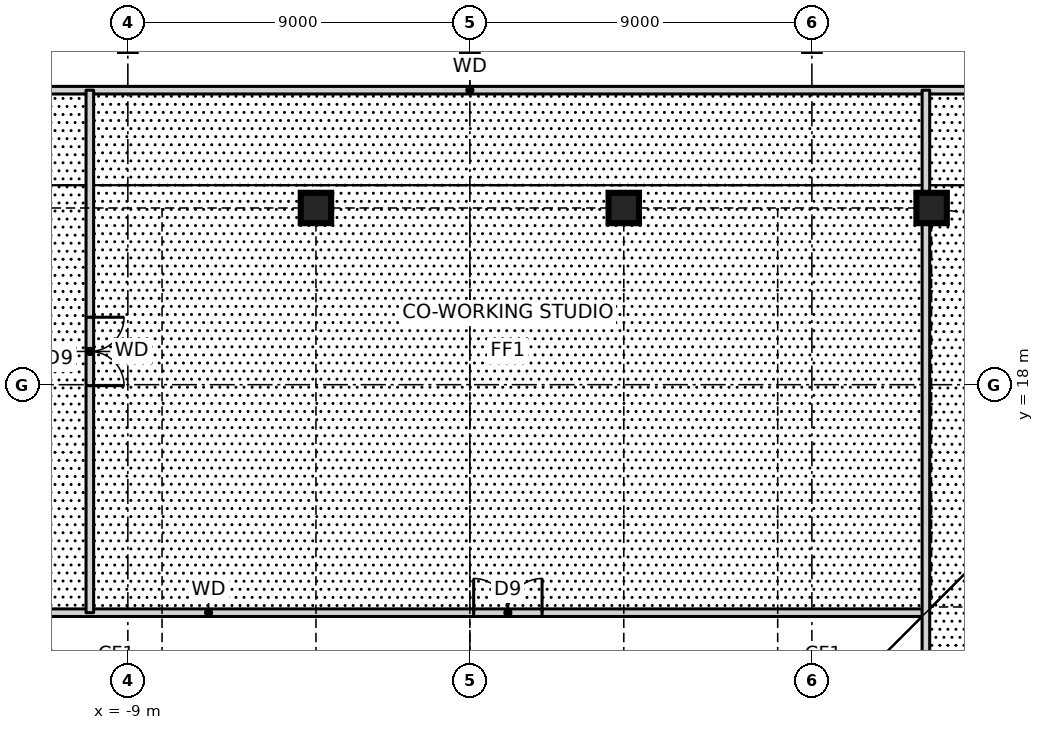
"""IFC4 building model, lengths in metres.
Left out: names, types, materials, properties, quantities, classifications, styles, units other than length and angle.
Written with IfcOpenShell. Run it as: python <this file> out.ifc"""

import sys

from ifc_helpers import new_model, si_unit, direction, frame, frame_2d, origin, origin_2d, place, context, subcontext, project, spatial, rectangle, hollow_rectangle, extrude, element, fill, save


model = new_model("IFC4")
c1 = context("Model", 3, precision=1e-05, world=origin(), true_north=direction((0.0, 1.0)))
c2 = subcontext(c1, "Body", "Model", "MODEL_VIEW")
j1 = project(units=[si_unit("LENGTHUNIT", "METRE"), si_unit("PLANEANGLEUNIT", "RADIAN")], contexts=[c1])
p1 = place(None, origin())
s1 = spatial("IfcSite", under=j1, at=p1, CompositionType="ELEMENT")
p2 = place(p1, origin())
s2 = spatial("IfcBuilding", under=s1, at=p2, CompositionType="ELEMENT")
p3 = place(p2, frame((0.0, 0.0, 10.5)))
s3 = spatial("IfcBuildingStorey", under=s2, at=p3, CompositionType="ELEMENT", Elevation=10.5)
for number, where, z_axis, x_axis in (
    (1, (12.15, 22.65, 0.0), (0.0, 0.0, 1.0), (1.0, 0.0, 0.0)),
    (2, (4.05, 22.65, 0.0), (0.0, 0.0, 1.0), (1.0, 0.0, 0.0)),
    (3, (-4.05, 22.65, 0.0), (0.0, 0.0, 1.0), (1.0, 0.0, 0.0)),
):
    element("IfcColumn", number, at=place(p3, frame(where, z_axis=z_axis, x_axis=x_axis)), inside=s3, PredefinedType="COLUMN", context=c2, shape_type="SweptSolid", body=[
        extrude(hollow_rectangle(XDim=0.8, YDim=0.8, WallThickness=0.09, at=origin_2d()), origin(), (0.0, 0.0, 1.0), 4.5),
    ])
p4 = place(p3, frame((-25.75, 12.0, 0.0), z_axis=(0.0, 0.0, 1.0), x_axis=(1.0, 0.0, 0.0)))
e4 = element("IfcWall", 4, at=p4, inside=s3, PredefinedType="SOLIDWALL", context=c2, shape_type="SweptSolid", body=[
    extrude(rectangle(XDim=37.75, YDim=0.2, at=frame_2d((18.875, 0.0))), origin(), (0.0, 0.0, 1.0), 4.25),
])
p5 = place(p4, frame((25.85, 0.0, 0.0)))
e5 = element("IfcOpeningElement", 5, at=p5, cuts=e4, PredefinedType="OPENING", context=c2, shape_type="SweptSolid", body=[
    extrude(rectangle(XDim=1.8, YDim=2.1, at=frame_2d((0.9, 1.05))), frame((0.0, 0.11, 0.0), z_axis=(0.0, -1.0, 0.0), x_axis=(1.0, 0.0, 0.0)), (0.0, 0.0, 1.0), 0.22),
])
p6 = place(p3, frame((-25.75, 25.75, 0.0), z_axis=(0.0, 0.0, 1.0), x_axis=(1.0, 0.0, 0.0)))
e6 = element("IfcWall", 6, at=p6, inside=s3, PredefinedType="SOLIDWALL", context=c2, shape_type="SweptSolid", body=[
    extrude(rectangle(XDim=51.5, YDim=0.2, at=frame_2d((25.75, 0.0))), origin(), (0.0, 0.0, 1.0), 4.25),
])
p7 = place(p3, frame((12.0, -12.0, 0.0), z_axis=(0.0, 0.0, 1.0), x_axis=(0.0, 1.0, 0.0)))
e7 = element("IfcWall", 7, at=p7, inside=s3, PredefinedType="SOLIDWALL", context=c2, shape_type="SweptSolid", body=[
    extrude(rectangle(XDim=37.75, YDim=0.2, at=frame_2d((18.875, 0.0))), origin(), (0.0, 0.0, 1.0), 4.25),
])
p8 = place(p7, frame((11.1, 0.0, 0.0)))
e8 = element("IfcOpeningElement", 8, at=p8, cuts=e7, PredefinedType="OPENING", context=c2, shape_type="SweptSolid", body=[
    extrude(rectangle(XDim=1.8, YDim=2.1, at=frame_2d((0.9, 1.05))), frame((0.0, 0.11, 0.0), z_axis=(0.0, -1.0, 0.0), x_axis=(1.0, 0.0, 0.0)), (0.0, 0.0, 1.0), 0.22),
])
p9 = place(p7, frame((0.25, 0.0, 0.0)))
e9 = element("IfcOpeningElement", 9, at=p9, cuts=e7, PredefinedType="OPENING", context=c2, shape_type="SweptSolid", body=[
    extrude(rectangle(XDim=1.8, YDim=2.1, at=frame_2d((0.9, 1.05))), frame((0.0, 0.11, 0.0), z_axis=(0.0, -1.0, 0.0), x_axis=(1.0, 0.0, 0.0)), (0.0, 0.0, 1.0), 0.22),
])
p10 = place(p3, frame((-10.0, 12.0, 0.0), z_axis=(0.0, 0.0, 1.0), x_axis=(0.0, 1.0, 0.0)))
e10 = element("IfcWall", 10, at=p10, inside=s3, PredefinedType="SOLIDWALL", context=c2, shape_type="SweptSolid", body=[
    extrude(rectangle(XDim=13.75, YDim=0.2, at=frame_2d((6.875, 0.0))), origin(), (0.0, 0.0, 1.0), 4.25),
])
p11 = place(p10, frame((5.975, 0.0, 0.0)))
e11 = element("IfcOpeningElement", 11, at=p11, cuts=e10, PredefinedType="OPENING", context=c2, shape_type="SweptSolid", body=[
    extrude(rectangle(XDim=1.8, YDim=2.1, at=frame_2d((0.9, 1.05))), frame((0.0, 0.11, 0.0), z_axis=(0.0, -1.0, 0.0), x_axis=(1.0, 0.0, 0.0)), (0.0, 0.0, 1.0), 0.22),
])
p12 = place(p5, origin())
e12 = element("IfcDoor", 12, at=p12, inside=s3, OperationType="DOUBLE_DOOR_SINGLE_SWING", PredefinedType="DOOR", context=c2, shape_type="SweptSolid", body=[
    extrude(rectangle(XDim=1.8, YDim=2.1, at=frame_2d((0.9, 1.05))), frame((0.0, 0.025, 0.0), z_axis=(0.0, -1.0, 0.0), x_axis=(1.0, 0.0, 0.0)), (0.0, 0.0, 1.0), 0.05),
])
fill(e5, e12)
p13 = place(p11, frame((1.8, 0.0, 0.0), z_axis=(0.0, 0.0, 1.0), x_axis=(-1.0, 0.0, 0.0)))
e13 = element("IfcDoor", 13, at=p13, inside=s3, OperationType="DOUBLE_DOOR_SINGLE_SWING", PredefinedType="DOOR", context=c2, shape_type="SweptSolid", body=[
    extrude(rectangle(XDim=1.8, YDim=2.1, at=frame_2d((0.9, 1.05))), frame((0.0, 0.025, 0.0), z_axis=(0.0, -1.0, 0.0), x_axis=(1.0, 0.0, 0.0)), (0.0, 0.0, 1.0), 0.05),
])
fill(e11, e13)
save(model, sys.argv[1])
